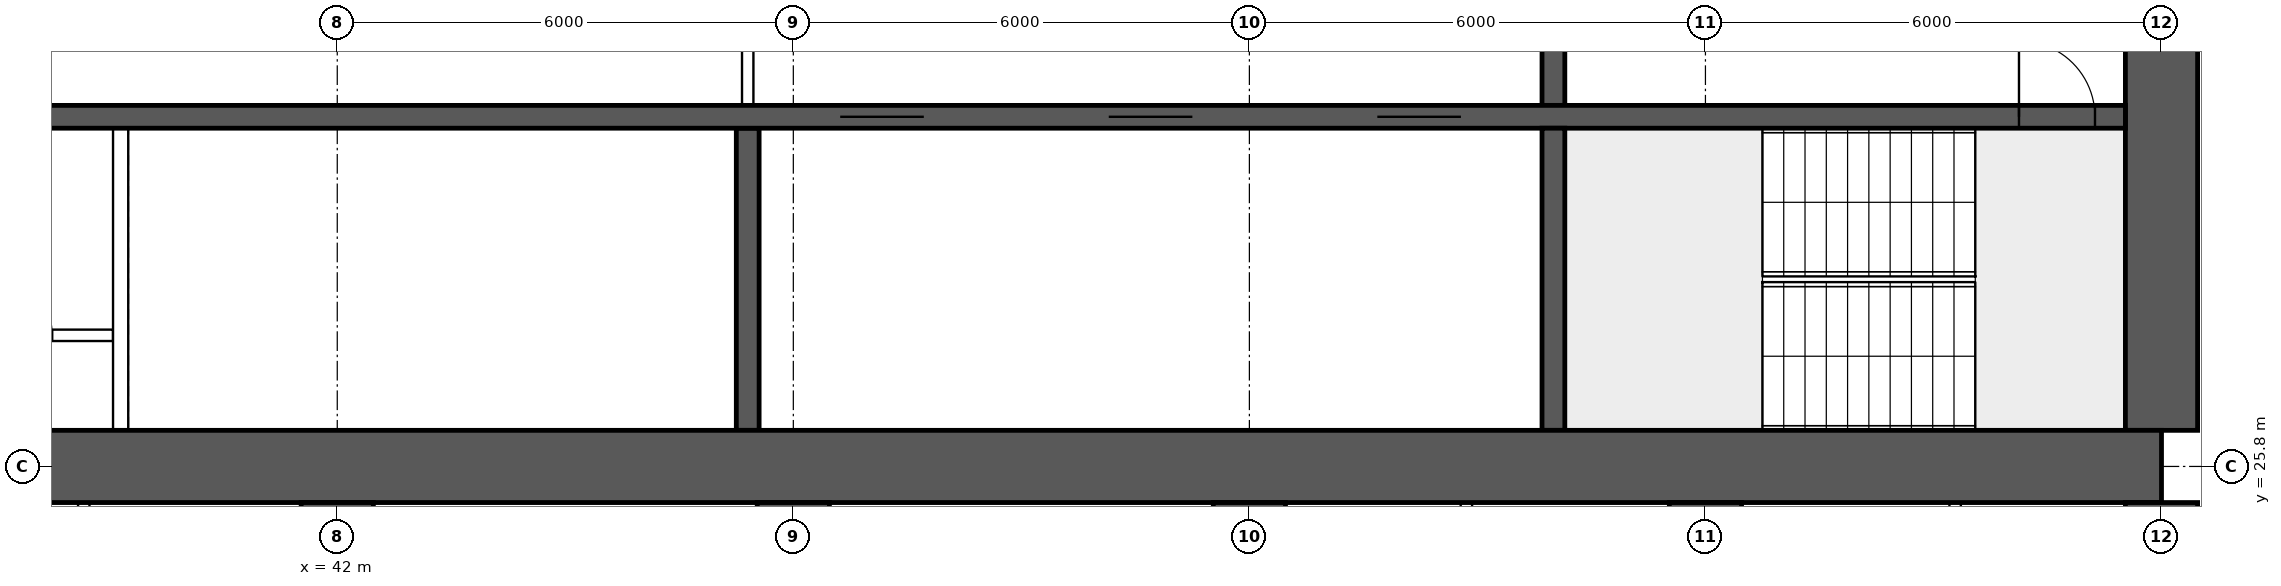
"""IFC4 building model, lengths in metres.
Left out: names, types, materials, properties, quantities, classifications, styles, units other than length and angle.
Written with IfcOpenShell. Run it as: python <this file> out.ifc"""

import sys

from ifc_helpers import new_model, si_unit, direction, frame, frame_2d, origin, place, context, subcontext, project, spatial, rectangle, extrude, element, fill, save


model = new_model("IFC4")
c1 = context("Model", 3, precision=1e-05, world=origin(), true_north=direction((0.0, 1.0)))
c2 = subcontext(c1, "Body", "Model", "MODEL_VIEW")
j1 = project(units=[si_unit("LENGTHUNIT", "METRE"), si_unit("PLANEANGLEUNIT", "RADIAN")], contexts=[c1])
p1 = place(None, origin())
s1 = spatial("IfcSite", under=j1, at=p1, CompositionType="ELEMENT")
p2 = place(p1, origin())
s2 = spatial("IfcBuilding", under=s1, at=p2, CompositionType="ELEMENT")
p3 = place(p2, frame((0.0, 0.0, 121.9)))
s3 = spatial("IfcBuildingStorey", under=s2, at=p3, CompositionType="ELEMENT", Elevation=121.9)
p4 = place(p3, frame((18.0, 25.8, 0.0), z_axis=(0.0, 0.0, 1.0), x_axis=(1.0, 0.0, 0.0)))
e1 = element("IfcWall", 1, at=p4, inside=s3, PredefinedType="SHEAR", context=c2, shape_type="SweptSolid", body=[
    extrude(rectangle(XDim=48.0, YDim=0.95, at=frame_2d((24.0, 0.0))), origin(), (0.0, 0.0, 1.0), 3.75),
])
p5 = place(p3, frame((66.0, 26.275, 0.0), z_axis=(0.0, 0.0, 1.0), x_axis=(0.0, 1.0, 0.0)))
e2 = element("IfcWall", 2, at=p5, inside=s3, PredefinedType="SHEAR", context=c2, shape_type="SweptSolid", body=[
    extrude(rectangle(XDim=11.45, YDim=0.95, at=frame_2d((5.725, 0.0))), origin(), (0.0, 0.0, 1.0), 3.75),
])
p6 = place(p5, frame((5.025, 0.0, 0.0)))
e3 = element("IfcOpeningElement", 3, at=p6, cuts=e2, PredefinedType="OPENING", context=c2, shape_type="SweptSolid", body=[
    extrude(rectangle(XDim=1.2, YDim=2.1, at=frame_2d((0.6, 1.05))), frame((0.0, 0.485, 0.0), z_axis=(0.0, -1.0, 0.0), x_axis=(1.0, 0.0, 0.0)), (0.0, 0.0, 1.0), 0.97),
])
p7 = place(p3, frame((18.475, 30.4, 0.0), z_axis=(0.0, 0.0, 1.0), x_axis=(1.0, 0.0, 0.0)))
e4 = element("IfcWall", 4, at=p7, inside=s3, PredefinedType="SHEAR", context=c2, shape_type="SweptSolid", body=[
    extrude(rectangle(XDim=47.05, YDim=0.3, at=frame_2d((23.525, 0.0))), origin(), (0.0, 0.0, 1.0), 3.75),
])
p8 = place(p7, frame((0.4, 0.0, 0.0)))
e5 = element("IfcOpeningElement", 5, at=p8, cuts=e4, PredefinedType="OPENING", context=c2, shape_type="SweptSolid", body=[
    extrude(rectangle(XDim=1.0, YDim=2.1, at=frame_2d((0.5, 1.05))), frame((0.0, 0.16, 0.0), z_axis=(0.0, -1.0, 0.0), x_axis=(1.0, 0.0, 0.0)), (0.0, 0.0, 1.0), 0.32),
])
p9 = place(p7, frame((45.65, 0.0, 0.0)))
e6 = element("IfcOpeningElement", 6, at=p9, cuts=e4, PredefinedType="OPENING", context=c2, shape_type="SweptSolid", body=[
    extrude(rectangle(XDim=1.0, YDim=2.1, at=frame_2d((0.5, 1.05))), frame((0.0, 0.16, 0.0), z_axis=(0.0, -1.0, 0.0), x_axis=(1.0, 0.0, 0.0)), (0.0, 0.0, 1.0), 0.32),
])
p10 = place(p7, frame((8.275, 0.0, 0.0)))
e7 = element("IfcOpeningElement", 7, at=p10, cuts=e4, PredefinedType="OPENING", context=c2, shape_type="SweptSolid", body=[
    extrude(rectangle(XDim=1.1, YDim=2.1, at=frame_2d((0.55, 1.05))), frame((0.0, 0.16, 0.0), z_axis=(0.0, -1.0, 0.0), x_axis=(1.0, 0.0, 0.0)), (0.0, 0.0, 1.0), 0.32),
])
p11 = place(p7, frame((10.875, 0.0, 0.0)))
e8 = element("IfcOpeningElement", 8, at=p11, cuts=e4, PredefinedType="OPENING", context=c2, shape_type="SweptSolid", body=[
    extrude(rectangle(XDim=1.1, YDim=2.1, at=frame_2d((0.55, 1.05))), frame((0.0, 0.16, 0.0), z_axis=(0.0, -1.0, 0.0), x_axis=(1.0, 0.0, 0.0)), (0.0, 0.0, 1.0), 0.32),
])
p12 = place(p7, frame((13.475, 0.0, 0.0)))
e9 = element("IfcOpeningElement", 9, at=p12, cuts=e4, PredefinedType="OPENING", context=c2, shape_type="SweptSolid", body=[
    extrude(rectangle(XDim=1.1, YDim=2.1, at=frame_2d((0.55, 1.05))), frame((0.0, 0.16, 0.0), z_axis=(0.0, -1.0, 0.0), x_axis=(1.0, 0.0, 0.0)), (0.0, 0.0, 1.0), 0.32),
])
p13 = place(p7, frame((16.075, 0.0, 0.0)))
e10 = element("IfcOpeningElement", 10, at=p13, cuts=e4, PredefinedType="OPENING", context=c2, shape_type="SweptSolid", body=[
    extrude(rectangle(XDim=1.1, YDim=2.1, at=frame_2d((0.55, 1.05))), frame((0.0, 0.16, 0.0), z_axis=(0.0, -1.0, 0.0), x_axis=(1.0, 0.0, 0.0)), (0.0, 0.0, 1.0), 0.32),
])
p14 = place(p7, frame((18.85, 0.0, 0.0)))
e11 = element("IfcOpeningElement", 11, at=p14, cuts=e4, PredefinedType="OPENING", context=c2, shape_type="SweptSolid", body=[
    extrude(rectangle(XDim=0.9, YDim=2.1, at=frame_2d((0.45, 1.05))), frame((0.0, 0.16, 0.0), z_axis=(0.0, -1.0, 0.0), x_axis=(1.0, 0.0, 0.0)), (0.0, 0.0, 1.0), 0.32),
])
p15 = place(p7, frame((30.142, 0.0, 0.0)))
e12 = element("IfcOpeningElement", 12, at=p15, cuts=e4, PredefinedType="OPENING", context=c2, shape_type="SweptSolid", body=[
    extrude(rectangle(XDim=1.1, YDim=2.1, at=frame_2d((0.55, 1.05))), frame((0.0, 0.16, 0.0), z_axis=(0.0, -1.0, 0.0), x_axis=(1.0, 0.0, 0.0)), (0.0, 0.0, 1.0), 0.32),
])
p16 = place(p7, frame((33.675, 0.0, 0.0)))
e13 = element("IfcOpeningElement", 13, at=p16, cuts=e4, PredefinedType="OPENING", context=c2, shape_type="SweptSolid", body=[
    extrude(rectangle(XDim=1.1, YDim=2.1, at=frame_2d((0.55, 1.05))), frame((0.0, 0.16, 0.0), z_axis=(0.0, -1.0, 0.0), x_axis=(1.0, 0.0, 0.0)), (0.0, 0.0, 1.0), 0.32),
])
p17 = place(p7, frame((37.208, 0.0, 0.0)))
e14 = element("IfcOpeningElement", 14, at=p17, cuts=e4, PredefinedType="OPENING", context=c2, shape_type="SweptSolid", body=[
    extrude(rectangle(XDim=1.1, YDim=2.1, at=frame_2d((0.55, 1.05))), frame((0.0, 0.16, 0.0), z_axis=(0.0, -1.0, 0.0), x_axis=(1.0, 0.0, 0.0)), (0.0, 0.0, 1.0), 0.32),
])
p18 = place(p3, frame((58.0, 26.275, 0.0), z_axis=(0.0, 0.0, 1.0), x_axis=(0.0, 1.0, 0.0)))
e15 = element("IfcWall", 15, at=p18, inside=s3, PredefinedType="SHEAR", context=c2, shape_type="SweptSolid", body=[
    extrude(rectangle(XDim=3.975, YDim=0.3, at=frame_2d((1.988, 0.0))), origin(), (0.0, 0.0, 1.0), 3.75),
])
p19 = place(p3, frame((58.0, 30.55, 0.0), z_axis=(0.0, 0.0, 1.0), x_axis=(0.0, 1.0, 0.0)))
e16 = element("IfcWall", 16, at=p19, inside=s3, PredefinedType="SHEAR", context=c2, shape_type="SweptSolid", body=[
    extrude(rectangle(XDim=3.9, YDim=0.3, at=frame_2d((1.95, 0.0))), origin(), (0.0, 0.0, 1.0), 3.75),
])
p20 = place(p19, frame((1.4, 0.0, 0.0)))
e17 = element("IfcOpeningElement", 17, at=p20, cuts=e16, PredefinedType="OPENING", context=c2, shape_type="SweptSolid", body=[
    extrude(rectangle(XDim=1.2, YDim=2.1, at=frame_2d((0.6, 1.05))), frame((0.0, 0.16, 0.0), z_axis=(0.0, -1.0, 0.0), x_axis=(1.0, 0.0, 0.0)), (0.0, 0.0, 1.0), 0.32),
])
p21 = place(p3, frame((47.4, 26.275, 0.0), z_axis=(0.0, 0.0, 1.0), x_axis=(0.0, 1.0, 0.0)))
e18 = element("IfcWall", 18, at=p21, inside=s3, PredefinedType="SHEAR", context=c2, shape_type="SweptSolid", body=[
    extrude(rectangle(XDim=3.975, YDim=0.3, at=frame_2d((1.988, 0.0))), origin(), (0.0, 0.0, 1.0), 3.75),
])
for number, where, z_axis, x_axis in (
    (19, (42.0, 16.0, 0.0), (0.0, 0.0, 1.0), (0.0, 1.0, 0.0)),
    (20, (48.0, 16.0, 0.0), (0.0, 0.0, 1.0), (0.0, 1.0, 0.0)),
    (21, (54.0, 16.0, 0.0), (0.0, 0.0, 1.0), (0.0, 1.0, 0.0)),
    (22, (60.0, 16.0, 0.0), (0.0, 0.0, 1.0), (0.0, 1.0, 0.0)),
    (23, (66.0, 16.0, 0.0), (0.0, 0.0, 1.0), (0.0, 1.0, 0.0)),
):
    element("IfcWall", number, at=place(p3, frame(where, z_axis=z_axis, x_axis=x_axis)), inside=s3, PredefinedType="SHEAR", context=c2, shape_type="SweptSolid", body=[
        extrude(rectangle(XDim=9.325, YDim=0.95, at=frame_2d((4.663, 0.0))), origin(), (0.0, 0.0, 1.0), 3.75),
    ])
p22 = place(p3, frame((47.4, 30.55, 0.0), z_axis=(0.0, 0.0, 1.0), x_axis=(0.0, 1.0, 0.0)))
e24 = element("IfcWall", 24, at=p22, inside=s3, PredefinedType="SOLIDWALL", context=c2, shape_type="SweptSolid", body=[
    extrude(rectangle(XDim=3.9, YDim=0.15, at=frame_2d((1.95, 0.0))), origin(), (0.0, 0.0, 1.0), 3.5),
])
p23 = place(p22, frame((1.15, 0.0, 0.0)))
e25 = element("IfcOpeningElement", 25, at=p23, cuts=e24, PredefinedType="OPENING", context=c2, shape_type="SweptSolid", body=[
    extrude(rectangle(XDim=1.6, YDim=2.1, at=frame_2d((0.8, 1.05))), frame((0.0, 0.085, 0.0), z_axis=(0.0, -1.0, 0.0), x_axis=(1.0, 0.0, 0.0)), (0.0, 0.0, 1.0), 0.17),
])
p24 = place(p3, frame((36.55, 27.525, 0.0), z_axis=(0.0, 0.0, 1.0), x_axis=(1.0, 0.0, 0.0)))
e26 = element("IfcWall", 26, at=p24, inside=s3, PredefinedType="SOLIDWALL", context=c2, shape_type="SweptSolid", body=[
    extrude(rectangle(XDim=2.5, YDim=0.15, at=frame_2d((1.25, 0.0))), origin(), (0.0, 0.0, 1.0), 3.5),
])
p25 = place(p24, frame((0.8, 0.0, 0.0)))
e27 = element("IfcOpeningElement", 27, at=p25, cuts=e26, PredefinedType="OPENING", context=c2, shape_type="SweptSolid", body=[
    extrude(rectangle(XDim=0.9, YDim=2.1, at=frame_2d((0.45, 1.05))), frame((0.0, 0.085, 0.0), z_axis=(0.0, -1.0, 0.0), x_axis=(1.0, 0.0, 0.0)), (0.0, 0.0, 1.0), 0.17),
])
p26 = place(p3, frame((39.15, 26.275, 0.0), z_axis=(0.0, 0.0, 1.0), x_axis=(0.0, 1.0, 0.0)))
e28 = element("IfcWall", 28, at=p26, inside=s3, PredefinedType="SOLIDWALL", context=c2, shape_type="SweptSolid", body=[
    extrude(rectangle(XDim=3.975, YDim=0.2, at=frame_2d((1.988, 0.0))), origin(), (0.0, 0.0, 1.0), 3.5),
])
for number, where, z_axis, x_axis in (
    (29, (38.665, 16.1, 0.0), (0.0, 0.0, 1.0), (0.0, 1.0, 0.0)),
    (30, (56.855, 16.1, 0.0), (0.0, 0.0, 1.0), (0.0, 1.0, 0.0)),
    (31, (63.285, 16.1, 0.0), (0.0, 0.0, 1.0), (0.0, 1.0, 0.0)),
):
    element("IfcWall", number, at=place(p3, frame(where, z_axis=z_axis, x_axis=x_axis)), inside=s3, PredefinedType="PARTITIONING", context=c2, shape_type="SweptSolid", body=[
        extrude(rectangle(XDim=9.225, YDim=0.15, at=frame_2d((4.612, 0.0))), origin(), (0.0, 0.0, 1.0), 3.5),
    ])
p27 = place(p9, origin())
e32 = element("IfcDoor", 32, at=p27, inside=s3, OperationType="SINGLE_SWING_LEFT", PredefinedType="DOOR", context=c2, shape_type="SweptSolid", body=[
    extrude(rectangle(XDim=1.0, YDim=2.1, at=frame_2d((0.5, 1.05))), frame((0.0, 0.025, 0.0), z_axis=(0.0, -1.0, 0.0), x_axis=(1.0, 0.0, 0.0)), (0.0, 0.0, 1.0), 0.05),
])
fill(e6, e32)
p28 = place(p15, origin())
e33 = element("IfcDoor", 33, at=p28, inside=s3, OperationType="DOUBLE_DOOR_SLIDING", PredefinedType="DOOR", context=c2, shape_type="SweptSolid", body=[
    extrude(rectangle(XDim=1.1, YDim=2.1, at=frame_2d((0.55, 1.05))), frame((0.0, 0.025, 0.0), z_axis=(0.0, -1.0, 0.0), x_axis=(1.0, 0.0, 0.0)), (0.0, 0.0, 1.0), 0.05),
])
fill(e12, e33)
p29 = place(p16, origin())
e34 = element("IfcDoor", 34, at=p29, inside=s3, OperationType="DOUBLE_DOOR_SLIDING", PredefinedType="DOOR", context=c2, shape_type="SweptSolid", body=[
    extrude(rectangle(XDim=1.1, YDim=2.1, at=frame_2d((0.55, 1.05))), frame((0.0, 0.025, 0.0), z_axis=(0.0, -1.0, 0.0), x_axis=(1.0, 0.0, 0.0)), (0.0, 0.0, 1.0), 0.05),
])
fill(e13, e34)
p30 = place(p17, origin())
e35 = element("IfcDoor", 35, at=p30, inside=s3, OperationType="DOUBLE_DOOR_SLIDING", PredefinedType="DOOR", context=c2, shape_type="SweptSolid", body=[
    extrude(rectangle(XDim=1.1, YDim=2.1, at=frame_2d((0.55, 1.05))), frame((0.0, 0.025, 0.0), z_axis=(0.0, -1.0, 0.0), x_axis=(1.0, 0.0, 0.0)), (0.0, 0.0, 1.0), 0.05),
])
fill(e14, e35)
save(model, sys.argv[1])
